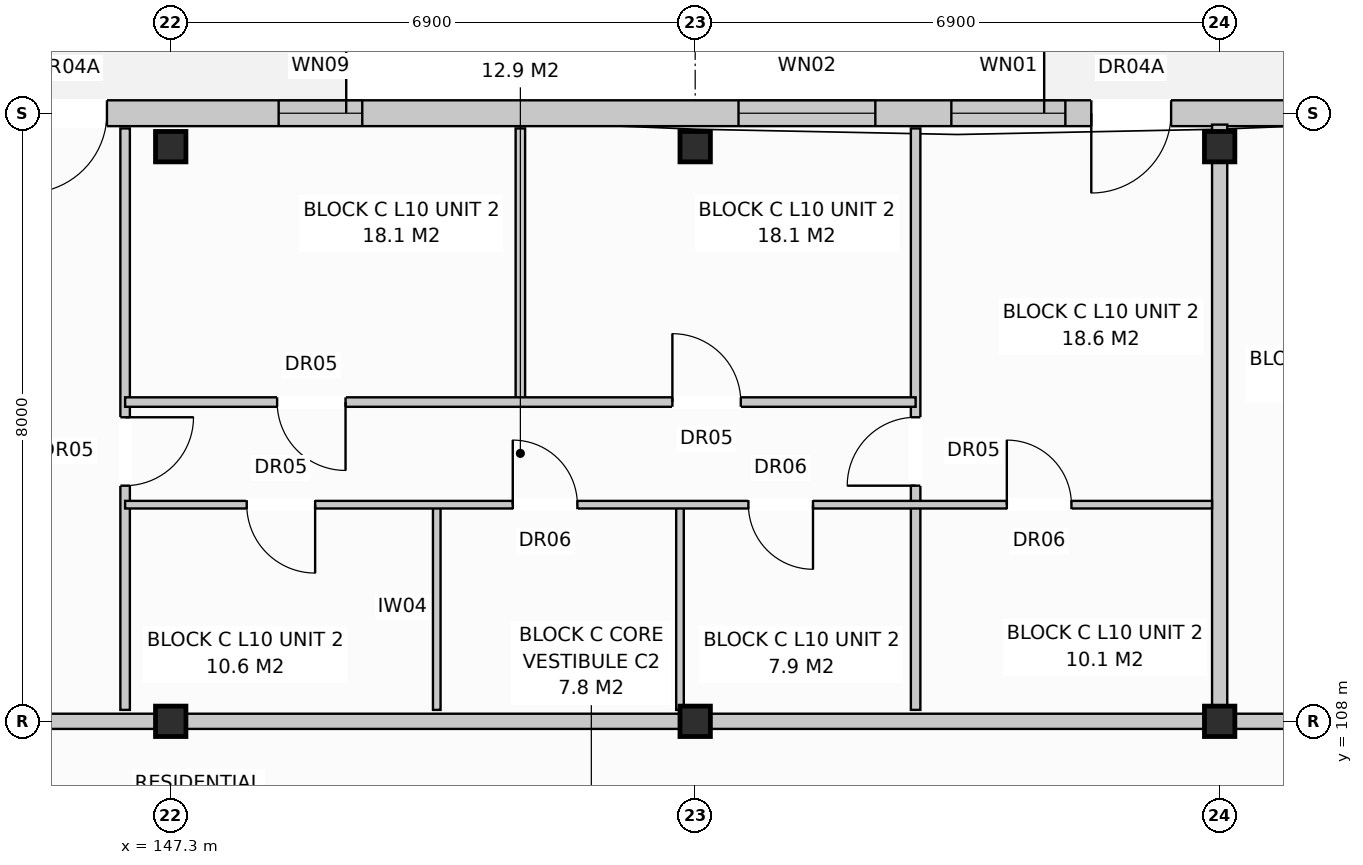
"""IFC4 building model, lengths in metres.
Left out: names, types, materials, properties, quantities, classifications, styles, units other than length and angle.
Written with IfcOpenShell. Run it as: python <this file> out.ifc"""

import sys

from ifc_helpers import new_model, si_unit, direction, frame, frame_2d, origin, origin_with_axes, origin_2d, place, context, subcontext, project, spatial, rectangle, extrude, element, fill, save


model = new_model("IFC4")
c1 = context("Model", 3, precision=1e-05, world=origin(), true_north=direction((0.0, 1.0)))
c2 = subcontext(c1, "Body", "Model", "MODEL_VIEW")
j1 = project(units=[si_unit("LENGTHUNIT", "METRE"), si_unit("PLANEANGLEUNIT", "RADIAN")], contexts=[c1])
p1 = place(None, origin())
s1 = spatial("IfcSite", under=j1, at=p1, CompositionType="ELEMENT")
p2 = place(p1, origin())
s2 = spatial("IfcBuilding", under=s1, at=p2, CompositionType="ELEMENT")
p3 = place(p2, frame((0.0, 0.0, 33.6)))
s3 = spatial("IfcBuildingStorey", under=s2, at=p3, CompositionType="ELEMENT", Elevation=33.6)
for number, where, z_axis, x_axis in (
    (1, (147.3, 108.0, 0.0), (0.0, 0.0, 1.0), (1.0, 0.0, 0.0)),
    (2, (147.3, 115.56, 0.0), (0.0, 0.0, 1.0), (1.0, 0.0, 0.0)),
    (3, (154.2, 108.0, 0.0), (0.0, 0.0, 1.0), (1.0, 0.0, 0.0)),
    (4, (154.2, 115.56, 0.0), (0.0, 0.0, 1.0), (1.0, 0.0, 0.0)),
    (5, (161.1, 108.0, 0.0), (0.0, 0.0, 1.0), (1.0, 0.0, 0.0)),
    (6, (161.1, 115.56, 0.0), (0.0, 0.0, 1.0), (1.0, 0.0, 0.0)),
):
    element("IfcColumn", number, at=place(p3, frame(where, z_axis=z_axis, x_axis=x_axis)), inside=s3, PredefinedType="COLUMN", context=c2, shape_type="SweptSolid", body=[
        extrude(rectangle(XDim=0.4, YDim=0.4, at=origin_2d()), origin(), (0.0, 0.0, 1.0), 3.2),
    ])
p4 = place(p3, frame((126.76, 116.0, 0.0), z_axis=(0.0, 0.0, 1.0), x_axis=(1.0, 0.0, 0.0)))
e7 = element("IfcWall", 7, at=p4, inside=s3, PredefinedType="STANDARD", context=c2, shape_type="SweptSolid", body=[
    extrude(rectangle(XDim=41.08, YDim=0.34, at=frame_2d((20.54, 0.0))), origin(), (0.0, 0.0, 1.0), 2.91),
])
p5 = place(p4, frame((7.36, 0.0, 0.0)))
e8 = element("IfcOpeningElement", 8, at=p5, cuts=e7, PredefinedType="OPENING", context=c2, shape_type="SweptSolid", body=[
    extrude(rectangle(XDim=1.05, YDim=2.12, at=frame_2d((0.525, 1.06))), frame((0.0, 0.182, 0.0), z_axis=(0.0, -1.0, 0.0), x_axis=(1.0, 0.0, 0.0)), (0.0, 0.0, 1.0), 0.364),
])
p6 = place(p4, frame((18.651, 0.0, 0.0)))
e9 = element("IfcOpeningElement", 9, at=p6, cuts=e7, PredefinedType="OPENING", context=c2, shape_type="SweptSolid", body=[
    extrude(rectangle(XDim=1.05, YDim=2.12, at=frame_2d((0.525, 1.06))), frame((0.0, 0.182, 0.0), z_axis=(0.0, -1.0, 0.0), x_axis=(1.0, 0.0, 0.0)), (0.0, 0.0, 1.0), 0.364),
])
p7 = place(p4, frame((32.651, 0.0, 0.0)))
e10 = element("IfcOpeningElement", 10, at=p7, cuts=e7, PredefinedType="OPENING", context=c2, shape_type="SweptSolid", body=[
    extrude(rectangle(XDim=1.05, YDim=2.12, at=frame_2d((0.525, 1.06))), frame((0.0, 0.182, 0.0), z_axis=(0.0, -1.0, 0.0), x_axis=(1.0, 0.0, 0.0)), (0.0, 0.0, 1.0), 0.364),
])
p8 = place(p4, frame((1.535, 0.0, 0.8)))
e11 = element("IfcOpeningElement", 11, at=p8, cuts=e7, PredefinedType="OPENING", context=c2, shape_type="SweptSolid", body=[
    extrude(rectangle(XDim=1.95, YDim=1.65, at=frame_2d((0.975, 0.825))), frame((0.0, 0.182, 0.0), z_axis=(0.0, -1.0, 0.0), x_axis=(1.0, 0.0, 0.0)), (0.0, 0.0, 1.0), 0.364),
])
p9 = place(p4, frame((10.51, 0.0, 0.8)))
e12 = element("IfcOpeningElement", 12, at=p9, cuts=e7, PredefinedType="OPENING", context=c2, shape_type="SweptSolid", body=[
    extrude(rectangle(XDim=1.8, YDim=1.7, at=frame_2d((0.9, 0.85))), frame((0.0, 0.182, 0.0), z_axis=(0.0, -1.0, 0.0), x_axis=(1.0, 0.0, 0.0)), (0.0, 0.0, 1.0), 0.364),
])
p10 = place(p4, frame((15.86, 0.0, 0.8)))
e13 = element("IfcOpeningElement", 13, at=p10, cuts=e7, PredefinedType="OPENING", context=c2, shape_type="SweptSolid", body=[
    extrude(rectangle(XDim=1.9, YDim=1.85, at=frame_2d((0.95, 0.925))), frame((0.0, 0.182, 0.0), z_axis=(0.0, -1.0, 0.0), x_axis=(1.0, 0.0, 0.0)), (0.0, 0.0, 1.0), 0.364),
])
p11 = place(p4, frame((21.96, 0.0, 0.72)))
e14 = element("IfcOpeningElement", 14, at=p11, cuts=e7, PredefinedType="OPENING", context=c2, shape_type="SweptSolid", body=[
    extrude(rectangle(XDim=1.1, YDim=1.5, at=frame_2d((0.55, 0.75))), frame((0.0, 0.182, 0.0), z_axis=(0.0, -1.0, 0.0), x_axis=(1.0, 0.0, 0.0)), (0.0, 0.0, 1.0), 0.364),
])
p12 = place(p4, frame((28.01, 0.0, 0.8)))
e15 = element("IfcOpeningElement", 15, at=p12, cuts=e7, PredefinedType="OPENING", context=c2, shape_type="SweptSolid", body=[
    extrude(rectangle(XDim=1.8, YDim=1.7, at=frame_2d((0.9, 0.85))), frame((0.0, 0.182, 0.0), z_axis=(0.0, -1.0, 0.0), x_axis=(1.0, 0.0, 0.0)), (0.0, 0.0, 1.0), 0.364),
])
p13 = place(p4, frame((30.81, 0.0, 0.85)))
e16 = element("IfcOpeningElement", 16, at=p13, cuts=e7, PredefinedType="OPENING", context=c2, shape_type="SweptSolid", body=[
    extrude(rectangle(XDim=1.5, YDim=1.65, at=frame_2d((0.75, 0.825))), frame((0.0, 0.182, 0.0), z_axis=(0.0, -1.0, 0.0), x_axis=(1.0, 0.0, 0.0)), (0.0, 0.0, 1.0), 0.364),
])
p14 = place(p4, frame((35.76, 0.0, 0.72)))
e17 = element("IfcOpeningElement", 17, at=p14, cuts=e7, PredefinedType="OPENING", context=c2, shape_type="SweptSolid", body=[
    extrude(rectangle(XDim=1.1, YDim=1.5, at=frame_2d((0.55, 0.75))), frame((0.0, 0.182, 0.0), z_axis=(0.0, -1.0, 0.0), x_axis=(1.0, 0.0, 0.0)), (0.0, 0.0, 1.0), 0.364),
])
p15 = place(p4, frame((38.675, 0.0, 0.8)))
e18 = element("IfcOpeningElement", 18, at=p15, cuts=e7, PredefinedType="OPENING", context=c2, shape_type="SweptSolid", body=[
    extrude(rectangle(XDim=1.8, YDim=1.7, at=frame_2d((0.9, 0.85))), frame((0.0, 0.182, 0.0), z_axis=(0.0, -1.0, 0.0), x_axis=(1.0, 0.0, 0.0)), (0.0, 0.0, 1.0), 0.364),
])
p16 = place(p3, frame((161.1, 108.15, 0.0), z_axis=(0.0, 0.0, 1.0), x_axis=(0.0, 1.0, 0.0)))
e19 = element("IfcWall", 19, at=p16, inside=s3, PredefinedType="PARTITIONING", context=c2, shape_type="SweptSolid", body=[
    extrude(rectangle(XDim=7.7, YDim=0.2, at=frame_2d((3.85, 0.0))), origin(), (0.0, 0.0, 1.0), 2.35),
])
p17 = place(p3, frame((140.4, 108.0, 0.0), z_axis=(0.0, 0.0, 1.0), x_axis=(1.0, 0.0, 0.0)))
e20 = element("IfcWall", 20, at=p17, inside=s3, PredefinedType="PARTITIONING", context=c2, shape_type="SweptSolid", body=[
    extrude(rectangle(XDim=20.7, YDim=0.2, at=frame_2d((10.35, 0.0))), origin(), (0.0, 0.0, 1.0), 2.35),
])
p18 = place(p17, frame((2.4, 0.0, 0.0)))
e21 = element("IfcOpeningElement", 21, at=p18, cuts=e20, PredefinedType="OPENING", context=c2, shape_type="SweptSolid", body=[
    extrude(rectangle(XDim=0.95, YDim=2.15, at=frame_2d((0.475, 1.075))), frame((0.0, 0.112, 0.0), z_axis=(0.0, -1.0, 0.0), x_axis=(1.0, 0.0, 0.0)), (0.0, 0.0, 1.0), 0.224),
])
p19 = place(p3, frame((146.7, 108.15, 0.0), z_axis=(0.0, 0.0, 1.0), x_axis=(0.0, 1.0, 0.0)))
e22 = element("IfcWall", 22, at=p19, inside=s3, PredefinedType="PARTITIONING", context=c2, shape_type="SweptSolid", body=[
    extrude(rectangle(XDim=7.65, YDim=0.125, at=frame_2d((3.825, 0.0))), origin(), (0.0, 0.0, 1.0), 2.96),
])
p20 = place(p19, frame((2.95, 0.0, 0.0)))
e23 = element("IfcOpeningElement", 23, at=p20, cuts=e22, PredefinedType="OPENING", context=c2, shape_type="SweptSolid", body=[
    extrude(rectangle(XDim=0.9, YDim=2.1, at=frame_2d((0.45, 1.05))), frame((0.0, 0.074, 0.0), z_axis=(0.0, -1.0, 0.0), x_axis=(1.0, 0.0, 0.0)), (0.0, 0.0, 1.0), 0.149),
])
for number, where, z_axis, x_axis in (
    (24, (150.8, 108.15, 0.0), (0.0, 0.0, 1.0), (0.0, 1.0, 0.0)),
    (25, (154.0, 108.15, 0.0), (0.0, 0.0, 1.0), (0.0, 1.0, 0.0)),
):
    element("IfcWall", number, at=place(p3, frame(where, z_axis=z_axis, x_axis=x_axis)), inside=s3, PredefinedType="PARTITIONING", context=c2, shape_type="SweptSolid", body=[
        extrude(rectangle(XDim=2.7, YDim=0.1, at=frame_2d((1.35, 0.0))), origin(), (0.0, 0.0, 1.0), 2.96),
    ])
p21 = place(p3, frame((151.9, 112.2, 0.0), z_axis=(0.0, 0.0, 1.0), x_axis=(0.0, 1.0, 0.0)))
e26 = element("IfcWall", 26, at=p21, inside=s3, PredefinedType="PARTITIONING", context=c2, shape_type="SweptSolid", body=[
    extrude(rectangle(XDim=3.6, YDim=0.125, at=frame_2d((1.8, 0.0))), origin(), (0.0, 0.0, 1.0), 2.96),
])
p22 = place(p3, frame((157.1, 108.15, 0.0), z_axis=(0.0, 0.0, 1.0), x_axis=(0.0, 1.0, 0.0)))
e27 = element("IfcWall", 27, at=p22, inside=s3, PredefinedType="PARTITIONING", context=c2, shape_type="SweptSolid", body=[
    extrude(rectangle(XDim=7.65, YDim=0.125, at=frame_2d((3.825, 0.0))), origin(), (0.0, 0.0, 1.0), 2.96),
])
p23 = place(p22, frame((2.95, 0.0, 0.0)))
e28 = element("IfcOpeningElement", 28, at=p23, cuts=e27, PredefinedType="OPENING", context=c2, shape_type="SweptSolid", body=[
    extrude(rectangle(XDim=0.9, YDim=2.1, at=frame_2d((0.45, 1.05))), frame((0.0, 0.074, 0.0), z_axis=(0.0, -1.0, 0.0), x_axis=(1.0, 0.0, 0.0)), (0.0, 0.0, 1.0), 0.149),
])
p24 = place(p3, frame((146.7, 110.85, 0.0), z_axis=(0.0, 0.0, 1.0), x_axis=(1.0, 0.0, 0.0)))
e29 = element("IfcWall", 29, at=p24, inside=s3, PredefinedType="PARTITIONING", context=c2, shape_type="SweptSolid", body=[
    extrude(rectangle(XDim=14.3, YDim=0.1, at=frame_2d((7.15, 0.0))), origin(), (0.0, 0.0, 1.0), 2.96),
])
p25 = place(p24, frame((1.6, 0.0, 0.0)))
e30 = element("IfcOpeningElement", 30, at=p25, cuts=e29, PredefinedType="OPENING", context=c2, shape_type="SweptSolid", body=[
    extrude(rectangle(XDim=0.9, YDim=2.1, at=frame_2d((0.45, 1.05))), frame((0.0, 0.062, 0.0), z_axis=(0.0, -1.0, 0.0), x_axis=(1.0, 0.0, 0.0)), (0.0, 0.0, 1.0), 0.124),
])
p26 = place(p24, frame((5.1, 0.0, 0.0)))
e31 = element("IfcOpeningElement", 31, at=p26, cuts=e29, PredefinedType="OPENING", context=c2, shape_type="SweptSolid", body=[
    extrude(rectangle(XDim=0.85, YDim=2.05, at=frame_2d((0.425, 1.025))), frame((0.0, 0.062, 0.0), z_axis=(0.0, -1.0, 0.0), x_axis=(1.0, 0.0, 0.0)), (0.0, 0.0, 1.0), 0.124),
])
p27 = place(p24, frame((8.2, 0.0, 0.0)))
e32 = element("IfcOpeningElement", 32, at=p27, cuts=e29, PredefinedType="OPENING", context=c2, shape_type="SweptSolid", body=[
    extrude(rectangle(XDim=0.85, YDim=2.05, at=frame_2d((0.425, 1.025))), frame((0.0, 0.062, 0.0), z_axis=(0.0, -1.0, 0.0), x_axis=(1.0, 0.0, 0.0)), (0.0, 0.0, 1.0), 0.124),
])
p28 = place(p24, frame((11.6, 0.0, 0.0)))
e33 = element("IfcOpeningElement", 33, at=p28, cuts=e29, PredefinedType="OPENING", context=c2, shape_type="SweptSolid", body=[
    extrude(rectangle(XDim=0.85, YDim=2.05, at=frame_2d((0.425, 1.025))), frame((0.0, 0.062, 0.0), z_axis=(0.0, -1.0, 0.0), x_axis=(1.0, 0.0, 0.0)), (0.0, 0.0, 1.0), 0.124),
])
p29 = place(p3, frame((146.7, 112.2, 0.0), z_axis=(0.0, 0.0, 1.0), x_axis=(1.0, 0.0, 0.0)))
e34 = element("IfcWall", 34, at=p29, inside=s3, PredefinedType="PARTITIONING", context=c2, shape_type="SweptSolid", body=[
    extrude(rectangle(XDim=10.4, YDim=0.125, at=frame_2d((5.2, 0.0))), origin(), (0.0, 0.0, 1.0), 2.96),
])
p30 = place(p29, frame((2.0, 0.0, 0.0)))
e35 = element("IfcOpeningElement", 35, at=p30, cuts=e34, PredefinedType="OPENING", context=c2, shape_type="SweptSolid", body=[
    extrude(rectangle(XDim=0.9, YDim=2.1, at=frame_2d((0.45, 1.05))), frame((0.0, 0.074, 0.0), z_axis=(0.0, -1.0, 0.0), x_axis=(1.0, 0.0, 0.0)), (0.0, 0.0, 1.0), 0.149),
])
p31 = place(p29, frame((7.2, 0.0, 0.0)))
e36 = element("IfcOpeningElement", 36, at=p31, cuts=e34, PredefinedType="OPENING", context=c2, shape_type="SweptSolid", body=[
    extrude(rectangle(XDim=0.9, YDim=2.1, at=frame_2d((0.45, 1.05))), frame((0.0, 0.074, 0.0), z_axis=(0.0, -1.0, 0.0), x_axis=(1.0, 0.0, 0.0)), (0.0, 0.0, 1.0), 0.149),
])
p32 = place(p3, frame((161.1, 108.0, 0.0), z_axis=(0.0, 0.0, 1.0), x_axis=(1.0, 0.0, 0.0)))
e37 = element("IfcWall", 37, at=p32, inside=s3, PredefinedType="PARTITIONING", context=c2, shape_type="SweptSolid", body=[
    extrude(rectangle(XDim=6.9, YDim=0.2, at=frame_2d((3.45, 0.0))), origin(), (0.0, 0.0, 1.0), 2.35),
])
p33 = place(p32, frame((2.0, 0.0, 0.0)))
e38 = element("IfcOpeningElement", 38, at=p33, cuts=e37, PredefinedType="OPENING", context=c2, shape_type="SweptSolid", body=[
    extrude(rectangle(XDim=0.95, YDim=2.15, at=frame_2d((0.475, 1.075))), frame((0.0, 0.112, 0.0), z_axis=(0.0, -1.0, 0.0), x_axis=(1.0, 0.0, 0.0)), (0.0, 0.0, 1.0), 0.224),
])
p34 = place(p6, frame((1.05, 0.0, 0.0), z_axis=(0.0, 0.0, 1.0), x_axis=(-1.0, 0.0, 0.0)))
e39 = element("IfcDoor", 39, at=p34, inside=s3, OperationType="SINGLE_SWING_LEFT", PredefinedType="DOOR", context=c2, shape_type="SweptSolid", body=[
    extrude(rectangle(XDim=1.05, YDim=2.12, at=frame_2d((0.525, 1.06))), frame((0.0, 0.025, 0.0), z_axis=(0.0, -1.0, 0.0), x_axis=(1.0, 0.0, 0.0)), (0.0, 0.0, 1.0), 0.05),
])
fill(e9, e39)
p35 = place(p7, frame((1.05, 0.0, 0.0), z_axis=(0.0, 0.0, 1.0), x_axis=(-1.0, 0.0, 0.0)))
e40 = element("IfcDoor", 40, at=p35, inside=s3, OperationType="SINGLE_SWING_LEFT", PredefinedType="DOOR", context=c2, shape_type="SweptSolid", body=[
    extrude(rectangle(XDim=1.05, YDim=2.12, at=frame_2d((0.525, 1.06))), frame((0.0, 0.025, 0.0), z_axis=(0.0, -1.0, 0.0), x_axis=(1.0, 0.0, 0.0)), (0.0, 0.0, 1.0), 0.05),
])
fill(e10, e40)
p36 = place(p11, origin_with_axes())
e41 = element("IfcWindow", 41, at=p36, inside=s3, PartitioningType="SINGLE_PANEL", PredefinedType="WINDOW", context=c2, shape_type="SweptSolid", body=[
    extrude(rectangle(XDim=1.1, YDim=1.5, at=frame_2d((0.55, 0.75))), frame((0.0, 0.03, 0.0), z_axis=(0.0, -1.0, 0.0), x_axis=(1.0, 0.0, 0.0)), (0.0, 0.0, 1.0), 0.06),
])
fill(e14, e41)
p37 = place(p12, origin_with_axes())
e42 = element("IfcWindow", 42, at=p37, inside=s3, PartitioningType="SINGLE_PANEL", PredefinedType="WINDOW", context=c2, shape_type="SweptSolid", body=[
    extrude(rectangle(XDim=1.8, YDim=1.7, at=frame_2d((0.9, 0.85))), frame((0.0, 0.03, 0.0), z_axis=(0.0, -1.0, 0.0), x_axis=(1.0, 0.0, 0.0)), (0.0, 0.0, 1.0), 0.06),
])
fill(e15, e42)
p38 = place(p13, origin_with_axes())
e43 = element("IfcWindow", 43, at=p38, inside=s3, PartitioningType="SINGLE_PANEL", PredefinedType="WINDOW", context=c2, shape_type="SweptSolid", body=[
    extrude(rectangle(XDim=1.5, YDim=1.65, at=frame_2d((0.75, 0.825))), frame((0.0, 0.03, 0.0), z_axis=(0.0, -1.0, 0.0), x_axis=(1.0, 0.0, 0.0)), (0.0, 0.0, 1.0), 0.06),
])
fill(e16, e43)
p39 = place(p20, frame((0.9, 0.0, 0.0), z_axis=(0.0, 0.0, 1.0), x_axis=(-1.0, 0.0, 0.0)))
e44 = element("IfcDoor", 44, at=p39, inside=s3, OperationType="SINGLE_SWING_RIGHT", PredefinedType="DOOR", context=c2, shape_type="SweptSolid", body=[
    extrude(rectangle(XDim=0.9, YDim=2.1, at=frame_2d((0.45, 1.05))), frame((0.0, 0.025, 0.0), z_axis=(0.0, -1.0, 0.0), x_axis=(1.0, 0.0, 0.0)), (0.0, 0.0, 1.0), 0.05),
])
fill(e23, e44)
p40 = place(p23, origin_with_axes())
e45 = element("IfcDoor", 45, at=p40, inside=s3, OperationType="SINGLE_SWING_LEFT", PredefinedType="DOOR", context=c2, shape_type="SweptSolid", body=[
    extrude(rectangle(XDim=0.9, YDim=2.1, at=frame_2d((0.45, 1.05))), frame((0.0, 0.025, 0.0), z_axis=(0.0, -1.0, 0.0), x_axis=(1.0, 0.0, 0.0)), (0.0, 0.0, 1.0), 0.05),
])
fill(e28, e45)
p41 = place(p25, frame((0.9, 0.0, 0.0), z_axis=(0.0, 0.0, 1.0), x_axis=(-1.0, 0.0, 0.0)))
e46 = element("IfcDoor", 46, at=p41, inside=s3, OperationType="SINGLE_SWING_RIGHT", PredefinedType="DOOR", context=c2, shape_type="SweptSolid", body=[
    extrude(rectangle(XDim=0.9, YDim=2.1, at=frame_2d((0.45, 1.05))), frame((0.0, 0.025, 0.0), z_axis=(0.0, -1.0, 0.0), x_axis=(1.0, 0.0, 0.0)), (0.0, 0.0, 1.0), 0.05),
])
fill(e30, e46)
p42 = place(p26, origin_with_axes())
e47 = element("IfcDoor", 47, at=p42, inside=s3, OperationType="SINGLE_SWING_LEFT", PredefinedType="DOOR", context=c2, shape_type="SweptSolid", body=[
    extrude(rectangle(XDim=0.85, YDim=2.05, at=frame_2d((0.425, 1.025))), frame((0.0, 0.025, 0.0), z_axis=(0.0, -1.0, 0.0), x_axis=(1.0, 0.0, 0.0)), (0.0, 0.0, 1.0), 0.05),
])
fill(e31, e47)
p43 = place(p27, frame((0.85, 0.0, 0.0), z_axis=(0.0, 0.0, 1.0), x_axis=(-1.0, 0.0, 0.0)))
e48 = element("IfcDoor", 48, at=p43, inside=s3, OperationType="SINGLE_SWING_RIGHT", PredefinedType="DOOR", context=c2, shape_type="SweptSolid", body=[
    extrude(rectangle(XDim=0.85, YDim=2.05, at=frame_2d((0.425, 1.025))), frame((0.0, 0.025, 0.0), z_axis=(0.0, -1.0, 0.0), x_axis=(1.0, 0.0, 0.0)), (0.0, 0.0, 1.0), 0.05),
])
fill(e32, e48)
p44 = place(p28, origin_with_axes())
e49 = element("IfcDoor", 49, at=p44, inside=s3, OperationType="SINGLE_SWING_LEFT", PredefinedType="DOOR", context=c2, shape_type="SweptSolid", body=[
    extrude(rectangle(XDim=0.85, YDim=2.05, at=frame_2d((0.425, 1.025))), frame((0.0, 0.025, 0.0), z_axis=(0.0, -1.0, 0.0), x_axis=(1.0, 0.0, 0.0)), (0.0, 0.0, 1.0), 0.05),
])
fill(e33, e49)
p45 = place(p30, frame((0.9, 0.0, 0.0), z_axis=(0.0, 0.0, 1.0), x_axis=(-1.0, 0.0, 0.0)))
e50 = element("IfcDoor", 50, at=p45, inside=s3, OperationType="SINGLE_SWING_RIGHT", PredefinedType="DOOR", context=c2, shape_type="SweptSolid", body=[
    extrude(rectangle(XDim=0.9, YDim=2.1, at=frame_2d((0.45, 1.05))), frame((0.0, 0.025, 0.0), z_axis=(0.0, -1.0, 0.0), x_axis=(1.0, 0.0, 0.0)), (0.0, 0.0, 1.0), 0.05),
])
fill(e35, e50)
p46 = place(p31, origin_with_axes())
e51 = element("IfcDoor", 51, at=p46, inside=s3, OperationType="SINGLE_SWING_LEFT", PredefinedType="DOOR", context=c2, shape_type="SweptSolid", body=[
    extrude(rectangle(XDim=0.9, YDim=2.1, at=frame_2d((0.45, 1.05))), frame((0.0, 0.025, 0.0), z_axis=(0.0, -1.0, 0.0), x_axis=(1.0, 0.0, 0.0)), (0.0, 0.0, 1.0), 0.05),
])
fill(e36, e51)
save(model, sys.argv[1])
